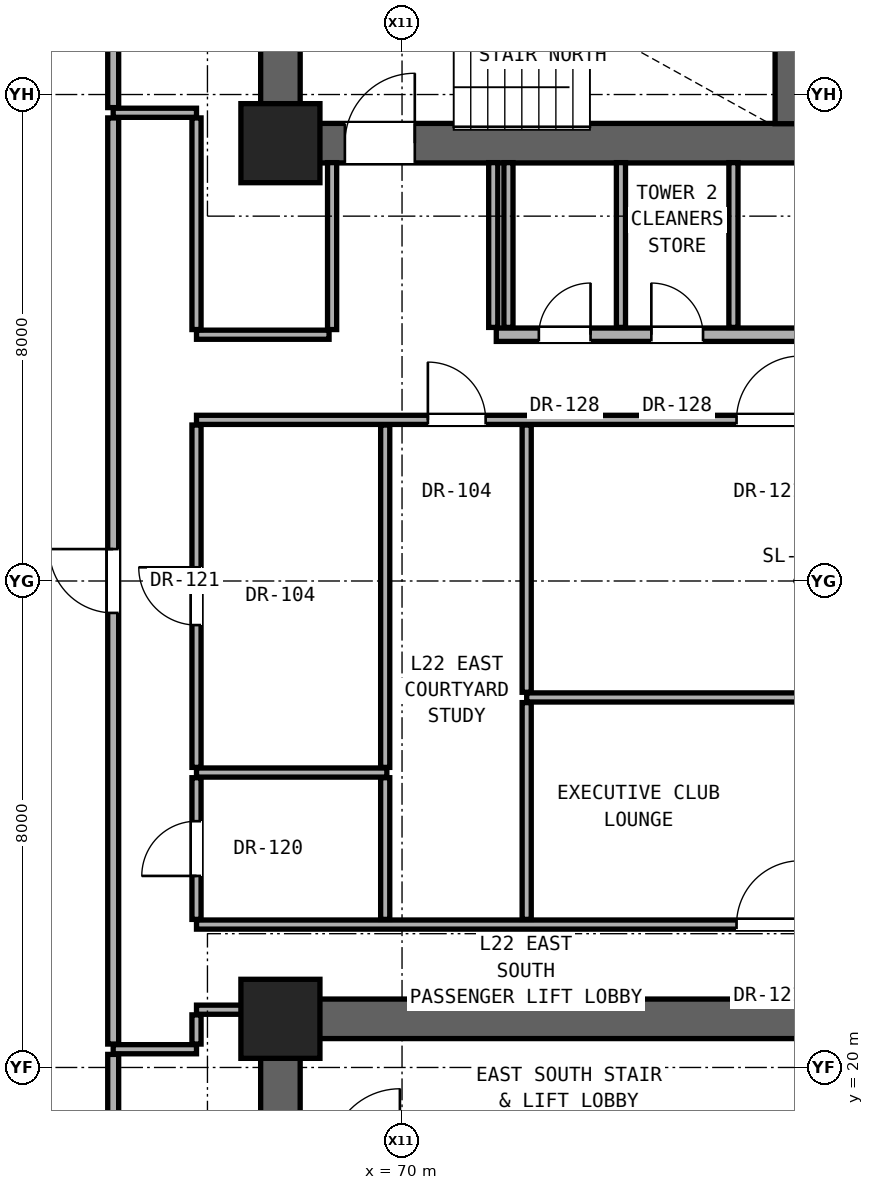
"""IFC4 building model, lengths in metres.
Left out: names, types, materials, properties, quantities, classifications, styles, units other than length and angle.
Written with IfcOpenShell. Run it as: python <this file> out.ifc"""

import sys

from ifc_helpers import new_model, si_unit, direction, frame, frame_2d, origin, origin_2d, place, context, subcontext, project, spatial, rectangle, extrude, element, fill, save


model = new_model("IFC4")
c1 = context("Model", 3, precision=1e-05, world=origin(), true_north=direction((0.0, 1.0)))
c2 = subcontext(c1, "Body", "Model", "MODEL_VIEW")
j1 = project(units=[si_unit("LENGTHUNIT", "METRE"), si_unit("PLANEANGLEUNIT", "RADIAN")], contexts=[c1])
p1 = place(None, origin())
s1 = spatial("IfcSite", under=j1, at=p1, CompositionType="ELEMENT")
p2 = place(p1, origin())
s2 = spatial("IfcBuilding", under=s1, at=p2, CompositionType="ELEMENT")
p3 = place(p2, frame((0.0, 0.0, 78.5)))
s3 = spatial("IfcBuildingStorey", under=s2, at=p3, CompositionType="ELEMENT", Elevation=78.5)
for number, where, z_axis, x_axis in (
    (1, (68.0, 20.8, 0.0), (0.0, 0.0, 1.0), (1.0, 0.0, 0.0)),
    (2, (68.0, 35.2, 0.0), (0.0, 0.0, 1.0), (1.0, 0.0, 0.0)),
):
    element("IfcColumn", number, at=place(p3, frame(where, z_axis=z_axis, x_axis=x_axis)), inside=s3, PredefinedType="COLUMN", context=c2, shape_type="SweptSolid", body=[
        extrude(rectangle(XDim=1.3, YDim=1.3, at=origin_2d()), origin(), (0.0, 0.0, 1.0), 3.3),
    ])
p4 = place(p3, frame((68.0, 35.2, 0.0), z_axis=(0.0, 0.0, 1.0), x_axis=(0.0, 1.0, 0.0)))
e3 = element("IfcWall", 3, at=p4, inside=s3, PredefinedType="SHEAR", context=c2, shape_type="SweptSolid", body=[
    extrude(rectangle(XDim=5.6, YDim=0.65, at=frame_2d((2.8, 0.0))), origin(), (0.0, 0.0, 1.0), 2.94),
])
p5 = place(p3, frame((68.0, 35.2, 0.0), z_axis=(0.0, 0.0, 1.0), x_axis=(1.0, 0.0, 0.0)))
e4 = element("IfcWall", 4, at=p5, inside=s3, PredefinedType="SHEAR", context=c2, shape_type="SweptSolid", body=[
    extrude(rectangle(XDim=17.0, YDim=0.65, at=frame_2d((8.5, 0.0))), origin(), (0.0, 0.0, 1.0), 2.94),
])
p6 = place(p5, frame((1.06, 0.0, 0.0)))
e5 = element("IfcOpeningElement", 5, at=p6, cuts=e4, PredefinedType="OPENING", context=c2, shape_type="SweptSolid", body=[
    extrude(rectangle(XDim=1.15, YDim=2.2, at=frame_2d((0.575, 1.1))), frame((0.0, 0.335, 0.0), z_axis=(0.0, -1.0, 0.0), x_axis=(1.0, 0.0, 0.0)), (0.0, 0.0, 1.0), 0.67),
])
p7 = place(p5, frame((8.75, 0.0, 0.0)))
e6 = element("IfcOpeningElement", 6, at=p7, cuts=e4, PredefinedType="OPENING", context=c2, shape_type="SweptSolid", body=[
    extrude(rectangle(XDim=1.4, YDim=2.35, at=frame_2d((0.7, 1.175))), frame((0.0, 0.335, 0.0), z_axis=(0.0, -1.0, 0.0), x_axis=(1.0, 0.0, 0.0)), (0.0, 0.0, 1.0), 0.67),
])
p8 = place(p5, frame((10.77, 0.0, 0.0)))
e7 = element("IfcOpeningElement", 7, at=p8, cuts=e4, PredefinedType="OPENING", context=c2, shape_type="SweptSolid", body=[
    extrude(rectangle(XDim=1.3, YDim=2.3, at=frame_2d((0.65, 1.15))), frame((0.0, 0.335, 0.0), z_axis=(0.0, -1.0, 0.0), x_axis=(1.0, 0.0, 0.0)), (0.0, 0.0, 1.0), 0.67),
])
p9 = place(p5, frame((12.69, 0.0, 0.0)))
e8 = element("IfcOpeningElement", 8, at=p9, cuts=e4, PredefinedType="OPENING", context=c2, shape_type="SweptSolid", body=[
    extrude(rectangle(XDim=1.3, YDim=2.3, at=frame_2d((0.65, 1.15))), frame((0.0, 0.335, 0.0), z_axis=(0.0, -1.0, 0.0), x_axis=(1.0, 0.0, 0.0)), (0.0, 0.0, 1.0), 0.67),
])
p10 = place(p5, frame((14.57, 0.0, 0.0)))
e9 = element("IfcOpeningElement", 9, at=p10, cuts=e4, PredefinedType="OPENING", context=c2, shape_type="SweptSolid", body=[
    extrude(rectangle(XDim=1.3, YDim=2.3, at=frame_2d((0.65, 1.15))), frame((0.0, 0.335, 0.0), z_axis=(0.0, -1.0, 0.0), x_axis=(1.0, 0.0, 0.0)), (0.0, 0.0, 1.0), 0.67),
])
p11 = place(p3, frame((68.0, 15.2, 0.0), z_axis=(0.0, 0.0, 1.0), x_axis=(0.0, 1.0, 0.0)))
e10 = element("IfcWall", 10, at=p11, inside=s3, PredefinedType="SHEAR", context=c2, shape_type="SweptSolid", body=[
    extrude(rectangle(XDim=5.6, YDim=0.65, at=frame_2d((2.8, 0.0))), origin(), (0.0, 0.0, 1.0), 2.94),
])
p12 = place(p3, frame((68.0, 20.8, 0.0), z_axis=(0.0, 0.0, 1.0), x_axis=(1.0, 0.0, 0.0)))
e11 = element("IfcWall", 11, at=p12, inside=s3, PredefinedType="SHEAR", context=c2, shape_type="SweptSolid", body=[
    extrude(rectangle(XDim=17.0, YDim=0.65, at=frame_2d((8.5, 0.0))), origin(), (0.0, 0.0, 1.0), 2.94),
])
p13 = place(p12, frame((9.55, 0.0, 0.0)))
e12 = element("IfcOpeningElement", 12, at=p13, cuts=e11, PredefinedType="OPENING", context=c2, shape_type="SweptSolid", body=[
    extrude(rectangle(XDim=1.3, YDim=2.3, at=frame_2d((0.65, 1.15))), frame((0.0, 0.335, 0.0), z_axis=(0.0, -1.0, 0.0), x_axis=(1.0, 0.0, 0.0)), (0.0, 0.0, 1.0), 0.67),
])
p14 = place(p12, frame((12.05, 0.0, 0.0)))
e13 = element("IfcOpeningElement", 13, at=p14, cuts=e11, PredefinedType="OPENING", context=c2, shape_type="SweptSolid", body=[
    extrude(rectangle(XDim=1.3, YDim=2.3, at=frame_2d((0.65, 1.15))), frame((0.0, 0.335, 0.0), z_axis=(0.0, -1.0, 0.0), x_axis=(1.0, 0.0, 0.0)), (0.0, 0.0, 1.0), 0.67),
])
p15 = place(p3, frame((65.25, 20.3, 0.0), z_axis=(0.0, 0.0, 1.0), x_axis=(1.0, 0.0, 0.0)))
e14 = element("IfcWall", 14, at=p15, inside=s3, PredefinedType="PARTITIONING", context=c2, shape_type="SweptSolid", body=[
    extrude(rectangle(XDim=1.37, YDim=0.15, at=frame_2d((0.685, 0.0))), origin(), (0.0, 0.0, 1.0), 2.94),
])
p16 = place(p3, frame((66.62, 20.95, 0.0), z_axis=(0.0, 0.0, 1.0), x_axis=(1.0, 0.0, 0.0)))
e15 = element("IfcWall", 15, at=p16, inside=s3, PredefinedType="PARTITIONING", context=c2, shape_type="SweptSolid", body=[
    extrude(rectangle(XDim=1.06, YDim=0.15, at=frame_2d((0.53, 0.0))), origin(), (0.0, 0.0, 1.0), 2.332),
])
p17 = place(p3, frame((66.62, 22.35, 0.0), z_axis=(0.0, 0.0, 1.0), x_axis=(1.0, 0.0, 0.0)))
e16 = element("IfcWall", 16, at=p17, inside=s3, PredefinedType="PARTITIONING", context=c2, shape_type="SweptSolid", body=[
    extrude(rectangle(XDim=19.63, YDim=0.15, at=frame_2d((9.815, 0.0))), origin(), (0.0, 0.0, 1.0), 2.316),
])
p18 = place(p17, frame((8.881, 0.0, 0.0)))
e17 = element("IfcOpeningElement", 17, at=p18, cuts=e16, PredefinedType="OPENING", context=c2, shape_type="SweptSolid", body=[
    extrude(rectangle(XDim=1.05, YDim=2.2, at=frame_2d((0.525, 1.1))), frame((0.0, 0.085, 0.0), z_axis=(0.0, -1.0, 0.0), x_axis=(1.0, 0.0, 0.0)), (0.0, 0.0, 1.0), 0.17),
])
p19 = place(p17, frame((15.961, 0.0, 0.0)))
e18 = element("IfcOpeningElement", 18, at=p19, cuts=e16, PredefinedType="OPENING", context=c2, shape_type="SweptSolid", body=[
    extrude(rectangle(XDim=1.05, YDim=2.2, at=frame_2d((0.525, 1.1))), frame((0.0, 0.085, 0.0), z_axis=(0.0, -1.0, 0.0), x_axis=(1.0, 0.0, 0.0)), (0.0, 0.0, 1.0), 0.17),
])
p20 = place(p3, frame((66.62, 24.85, 0.0), z_axis=(0.0, 0.0, 1.0), x_axis=(1.0, 0.0, 0.0)))
e19 = element("IfcWall", 19, at=p20, inside=s3, PredefinedType="PARTITIONING", context=c2, shape_type="SweptSolid", body=[
    extrude(rectangle(XDim=3.13, YDim=0.15, at=frame_2d((1.565, 0.0))), origin(), (0.0, 0.0, 1.0), 2.316),
])
p21 = place(p3, frame((72.05, 26.085, 0.0), z_axis=(0.0, 0.0, 1.0), x_axis=(1.0, 0.0, 0.0)))
e20 = element("IfcWall", 20, at=p21, inside=s3, PredefinedType="PARTITIONING", context=c2, shape_type="SweptSolid", body=[
    extrude(rectangle(XDim=14.2, YDim=0.15, at=frame_2d((7.1, 0.0))), origin(), (0.0, 0.0, 1.0), 2.316),
])
p22 = place(p3, frame((66.62, 30.65, 0.0), z_axis=(0.0, 0.0, 1.0), x_axis=(1.0, 0.0, 0.0)))
e21 = element("IfcWall", 21, at=p22, inside=s3, PredefinedType="PARTITIONING", context=c2, shape_type="SweptSolid", body=[
    extrude(rectangle(XDim=19.63, YDim=0.15, at=frame_2d((9.815, 0.0))), origin(), (0.0, 0.0, 1.0), 2.316),
])
p23 = place(p22, frame((3.805, 0.0, 0.0)))
e22 = element("IfcOpeningElement", 22, at=p23, cuts=e21, PredefinedType="OPENING", context=c2, shape_type="SweptSolid", body=[
    extrude(rectangle(XDim=0.95, YDim=2.15, at=frame_2d((0.475, 1.075))), frame((0.0, 0.085, 0.0), z_axis=(0.0, -1.0, 0.0), x_axis=(1.0, 0.0, 0.0)), (0.0, 0.0, 1.0), 0.17),
])
p24 = place(p22, frame((8.881, 0.0, 0.0)))
e23 = element("IfcOpeningElement", 23, at=p24, cuts=e21, PredefinedType="OPENING", context=c2, shape_type="SweptSolid", body=[
    extrude(rectangle(XDim=1.05, YDim=2.2, at=frame_2d((0.525, 1.1))), frame((0.0, 0.085, 0.0), z_axis=(0.0, -1.0, 0.0), x_axis=(1.0, 0.0, 0.0)), (0.0, 0.0, 1.0), 0.17),
])
p25 = place(p22, frame((15.961, 0.0, 0.0)))
e24 = element("IfcOpeningElement", 24, at=p25, cuts=e21, PredefinedType="OPENING", context=c2, shape_type="SweptSolid", body=[
    extrude(rectangle(XDim=1.05, YDim=2.2, at=frame_2d((0.525, 1.1))), frame((0.0, 0.085, 0.0), z_axis=(0.0, -1.0, 0.0), x_axis=(1.0, 0.0, 0.0)), (0.0, 0.0, 1.0), 0.17),
])
p26 = place(p3, frame((66.62, 32.05, 0.0), z_axis=(0.0, 0.0, 1.0), x_axis=(1.0, 0.0, 0.0)))
e25 = element("IfcWall", 25, at=p26, inside=s3, PredefinedType="PARTITIONING", context=c2, shape_type="SweptSolid", body=[
    extrude(rectangle(XDim=2.18, YDim=0.15, at=frame_2d((1.09, 0.0))), origin(), (0.0, 0.0, 1.0), 2.316),
])
p27 = place(p3, frame((71.55, 32.05, 0.0), z_axis=(0.0, 0.0, 1.0), x_axis=(1.0, 0.0, 0.0)))
e26 = element("IfcWall", 26, at=p27, inside=s3, PredefinedType="SOLIDWALL", context=c2, shape_type="SweptSolid", body=[
    extrude(rectangle(XDim=14.7, YDim=0.22, at=frame_2d((7.35, 0.0))), origin(), (0.0, 0.0, 1.0), 2.316),
])
p28 = place(p27, frame((11.215, 0.0, 0.0)))
e27 = element("IfcOpeningElement", 27, at=p28, cuts=e26, PredefinedType="OPENING", context=c2, shape_type="SweptSolid", body=[
    extrude(rectangle(XDim=1.2, YDim=2.25, at=frame_2d((0.6, 1.125))), frame((0.0, 0.12, 0.0), z_axis=(0.0, -1.0, 0.0), x_axis=(1.0, 0.0, 0.0)), (0.0, 0.0, 1.0), 0.24),
])
p29 = place(p27, frame((5.89, 0.0, 0.0)))
e28 = element("IfcOpeningElement", 28, at=p29, cuts=e26, PredefinedType="OPENING", context=c2, shape_type="SweptSolid", body=[
    extrude(rectangle(XDim=1.2, YDim=2.25, at=frame_2d((0.6, 1.125))), frame((0.0, 0.12, 0.0), z_axis=(0.0, -1.0, 0.0), x_axis=(1.0, 0.0, 0.0)), (0.0, 0.0, 1.0), 0.24),
])
p30 = place(p27, frame((0.7, 0.0, 0.0)))
e29 = element("IfcOpeningElement", 29, at=p30, cuts=e26, PredefinedType="OPENING", context=c2, shape_type="SweptSolid", body=[
    extrude(rectangle(XDim=0.85, YDim=2.01, at=frame_2d((0.425, 1.005))), frame((0.0, 0.12, 0.0), z_axis=(0.0, -1.0, 0.0), x_axis=(1.0, 0.0, 0.0)), (0.0, 0.0, 1.0), 0.24),
])
p31 = place(p27, frame((2.55, 0.0, 0.0)))
e30 = element("IfcOpeningElement", 30, at=p31, cuts=e26, PredefinedType="OPENING", context=c2, shape_type="SweptSolid", body=[
    extrude(rectangle(XDim=0.85, YDim=2.01, at=frame_2d((0.425, 1.005))), frame((0.0, 0.12, 0.0), z_axis=(0.0, -1.0, 0.0), x_axis=(1.0, 0.0, 0.0)), (0.0, 0.0, 1.0), 0.24),
])
p32 = place(p3, frame((65.25, 35.7, 0.0), z_axis=(0.0, 0.0, 1.0), x_axis=(1.0, 0.0, 0.0)))
e31 = element("IfcWall", 31, at=p32, inside=s3, PredefinedType="PARTITIONING", context=c2, shape_type="SweptSolid", body=[
    extrude(rectangle(XDim=1.37, YDim=0.15, at=frame_2d((0.685, 0.0))), origin(), (0.0, 0.0, 1.0), 2.94),
])
p33 = place(p3, frame((65.25, 16.204, 0.0), z_axis=(0.0, 0.0, 1.0), x_axis=(0.0, 1.0, 0.0)))
e32 = element("IfcWall", 32, at=p33, inside=s3, PredefinedType="PARTITIONING", context=c2, shape_type="SweptSolid", body=[
    extrude(rectangle(XDim=4.011, YDim=0.18, at=frame_2d((2.005, 0.0))), origin(), (0.0, 0.0, 1.0), 2.316),
])
p34 = place(p3, frame((65.25, 20.385, 0.0), z_axis=(0.0, 0.0, 1.0), x_axis=(0.0, 1.0, 0.0)))
e33 = element("IfcWall", 33, at=p34, inside=s3, PredefinedType="PARTITIONING", context=c2, shape_type="SweptSolid", body=[
    extrude(rectangle(XDim=15.23, YDim=0.18, at=frame_2d((7.615, 0.0))), origin(), (0.0, 0.0, 1.0), 2.316),
])
p35 = place(p34, frame((7.09, 0.0, 0.0)))
e34 = element("IfcOpeningElement", 34, at=p35, cuts=e33, PredefinedType="OPENING", context=c2, shape_type="SweptSolid", body=[
    extrude(rectangle(XDim=1.05, YDim=2.2, at=frame_2d((0.525, 1.1))), frame((0.0, 0.1, 0.0), z_axis=(0.0, -1.0, 0.0), x_axis=(1.0, 0.0, 0.0)), (0.0, 0.0, 1.0), 0.2),
])
p36 = place(p3, frame((65.25, 35.785, 0.0), z_axis=(0.0, 0.0, 1.0), x_axis=(0.0, 1.0, 0.0)))
e35 = element("IfcWall", 35, at=p36, inside=s3, PredefinedType="PARTITIONING", context=c2, shape_type="SweptSolid", body=[
    extrude(rectangle(XDim=1.291, YDim=0.18, at=frame_2d((0.646, 0.0))), origin(), (0.0, 0.0, 1.0), 2.94),
])
p37 = place(p3, frame((66.62, 20.385, 0.0), z_axis=(0.0, 0.0, 1.0), x_axis=(0.0, 1.0, 0.0)))
e36 = element("IfcWall", 36, at=p37, inside=s3, PredefinedType="PARTITIONING", context=c2, shape_type="SweptSolid", body=[
    extrude(rectangle(XDim=0.48, YDim=0.15, at=frame_2d((0.24, 0.0))), origin(), (0.0, 0.0, 1.0), 2.332),
])
p38 = place(p3, frame((66.62, 22.435, 0.0), z_axis=(0.0, 0.0, 1.0), x_axis=(0.0, 1.0, 0.0)))
e37 = element("IfcWall", 37, at=p38, inside=s3, PredefinedType="PARTITIONING", context=c2, shape_type="SweptSolid", body=[
    extrude(rectangle(XDim=2.33, YDim=0.15, at=frame_2d((1.165, 0.0))), origin(), (0.0, 0.0, 1.0), 2.94),
])
p39 = place(p38, frame((0.715, 0.0, 0.0)))
e38 = element("IfcOpeningElement", 38, at=p39, cuts=e37, PredefinedType="OPENING", context=c2, shape_type="SweptSolid", body=[
    extrude(rectangle(XDim=0.9, YDim=2.1, at=frame_2d((0.45, 1.05))), frame((0.0, 0.085, 0.0), z_axis=(0.0, -1.0, 0.0), x_axis=(1.0, 0.0, 0.0)), (0.0, 0.0, 1.0), 0.17),
])
p40 = place(p3, frame((66.62, 24.935, 0.0), z_axis=(0.0, 0.0, 1.0), x_axis=(0.0, 1.0, 0.0)))
e39 = element("IfcWall", 39, at=p40, inside=s3, PredefinedType="PARTITIONING", context=c2, shape_type="SweptSolid", body=[
    extrude(rectangle(XDim=5.63, YDim=0.15, at=frame_2d((2.815, 0.0))), origin(), (0.0, 0.0, 1.0), 2.316),
])
p41 = place(p40, frame((2.34, 0.0, 0.0)))
e40 = element("IfcOpeningElement", 40, at=p41, cuts=e39, PredefinedType="OPENING", context=c2, shape_type="SweptSolid", body=[
    extrude(rectangle(XDim=0.95, YDim=2.15, at=frame_2d((0.475, 1.075))), frame((0.0, 0.085, 0.0), z_axis=(0.0, -1.0, 0.0), x_axis=(1.0, 0.0, 0.0)), (0.0, 0.0, 1.0), 0.17),
])
p42 = place(p3, frame((66.62, 32.135, 0.0), z_axis=(0.0, 0.0, 1.0), x_axis=(0.0, 1.0, 0.0)))
e41 = element("IfcWall", 41, at=p42, inside=s3, PredefinedType="PARTITIONING", context=c2, shape_type="SweptSolid", body=[
    extrude(rectangle(XDim=3.48, YDim=0.15, at=frame_2d((1.74, 0.0))), origin(), (0.0, 0.0, 1.0), 2.332),
])
p43 = place(p3, frame((68.85, 32.135, 0.0), z_axis=(0.0, 0.0, 1.0), x_axis=(0.0, 1.0, 0.0)))
e42 = element("IfcWall", 42, at=p43, inside=s3, PredefinedType="PARTITIONING", context=c2, shape_type="SweptSolid", body=[
    extrude(rectangle(XDim=2.745, YDim=0.15, at=frame_2d((1.373, 0.0))), origin(), (0.0, 0.0, 1.0), 2.94),
])
p44 = place(p3, frame((69.723, 22.435, 0.0), z_axis=(0.0, 0.0, 1.0), x_axis=(0.0, 1.0, 0.0)))
e43 = element("IfcWall", 43, at=p44, inside=s3, PredefinedType="PARTITIONING", context=c2, shape_type="SweptSolid", body=[
    extrude(rectangle(XDim=2.33, YDim=0.15, at=frame_2d((1.165, 0.0))), origin(), (0.0, 0.0, 1.0), 2.94),
])
p45 = place(p3, frame((69.723, 24.935, 0.0), z_axis=(0.0, 0.0, 1.0), x_axis=(0.0, 1.0, 0.0)))
e44 = element("IfcWall", 44, at=p45, inside=s3, PredefinedType="PARTITIONING", context=c2, shape_type="SweptSolid", body=[
    extrude(rectangle(XDim=5.63, YDim=0.15, at=frame_2d((2.815, 0.0))), origin(), (0.0, 0.0, 1.0), 2.316),
])
for number, where, z_axis, x_axis in (
    (45, (71.5, 32.17, 0.0), (0.0, 0.0, 1.0), (0.0, 1.0, 0.0)),
    (46, (71.75, 32.17, 0.0), (0.0, 0.0, 1.0), (0.0, 1.0, 0.0)),
):
    element("IfcWall", number, at=place(p3, frame(where, z_axis=z_axis, x_axis=x_axis)), inside=s3, PredefinedType="PARTITIONING", context=c2, shape_type="SweptSolid", body=[
        extrude(rectangle(XDim=2.71, YDim=0.15, at=frame_2d((1.355, 0.0))), origin(), (0.0, 0.0, 1.0), 2.94),
    ])
p46 = place(p3, frame((72.05, 22.435, 0.0), z_axis=(0.0, 0.0, 1.0), x_axis=(0.0, 1.0, 0.0)))
e47 = element("IfcWall", 47, at=p46, inside=s3, PredefinedType="PARTITIONING", context=c2, shape_type="SweptSolid", body=[
    extrude(rectangle(XDim=3.565, YDim=0.15, at=frame_2d((1.782, 0.0))), origin(), (0.0, 0.0, 1.0), 2.469),
])
p47 = place(p3, frame((72.05, 26.17, 0.0), z_axis=(0.0, 0.0, 1.0), x_axis=(0.0, 1.0, 0.0)))
e48 = element("IfcWall", 48, at=p47, inside=s3, PredefinedType="PARTITIONING", context=c2, shape_type="SweptSolid", body=[
    extrude(rectangle(XDim=4.395, YDim=0.15, at=frame_2d((2.198, 0.0))), origin(), (0.0, 0.0, 1.0), 2.316),
])
for number, where, z_axis, x_axis in (
    (49, (73.6, 32.17, 0.0), (0.0, 0.0, 1.0), (0.0, 1.0, 0.0)),
    (50, (75.45, 32.17, 0.0), (0.0, 0.0, 1.0), (0.0, 1.0, 0.0)),
):
    element("IfcWall", number, at=place(p3, frame(where, z_axis=z_axis, x_axis=x_axis)), inside=s3, PredefinedType="PARTITIONING", context=c2, shape_type="SweptSolid", body=[
        extrude(rectangle(XDim=2.71, YDim=0.15, at=frame_2d((1.355, 0.0))), origin(), (0.0, 0.0, 1.0), 2.94),
    ])
p48 = place(p3, frame((76.36, 35.52, 0.0), z_axis=(0.0, 0.0, 1.0), x_axis=(0.0, 1.0, 0.0)))
e51 = element("IfcWall", 51, at=p48, inside=s3, PredefinedType="SHEAR", context=c2, shape_type="SweptSolid", body=[
    extrude(rectangle(XDim=2.745, YDim=0.45, at=frame_2d((1.373, 0.0))), origin(), (0.0, 0.0, 1.0), 2.94),
])
p49 = place(p6, origin())
e52 = element("IfcDoor", 52, at=p49, inside=s3, OperationType="SINGLE_SWING_RIGHT", PredefinedType="DOOR", context=c2, shape_type="SweptSolid", body=[
    extrude(rectangle(XDim=1.15, YDim=2.2, at=frame_2d((0.575, 1.1))), frame((0.0, 0.025, 0.0), z_axis=(0.0, -1.0, 0.0), x_axis=(1.0, 0.0, 0.0)), (0.0, 0.0, 1.0), 0.05),
])
fill(e5, e52)
p50 = place(p30, origin())
e53 = element("IfcDoor", 53, at=p50, inside=s3, OperationType="SINGLE_SWING_RIGHT", PredefinedType="DOOR", context=c2, shape_type="SweptSolid", body=[
    extrude(rectangle(XDim=0.85, YDim=2.01, at=frame_2d((0.425, 1.005))), frame((0.0, 0.025, 0.0), z_axis=(0.0, -1.0, 0.0), x_axis=(1.0, 0.0, 0.0)), (0.0, 0.0, 1.0), 0.05),
])
fill(e29, e53)
p51 = place(p31, origin())
e54 = element("IfcDoor", 54, at=p51, inside=s3, OperationType="SINGLE_SWING_LEFT", PredefinedType="DOOR", context=c2, shape_type="SweptSolid", body=[
    extrude(rectangle(XDim=0.85, YDim=2.01, at=frame_2d((0.425, 1.005))), frame((0.0, 0.025, 0.0), z_axis=(0.0, -1.0, 0.0), x_axis=(1.0, 0.0, 0.0)), (0.0, 0.0, 1.0), 0.05),
])
fill(e30, e54)
p52 = place(p39, origin())
e55 = element("IfcDoor", 55, at=p52, inside=s3, OperationType="SINGLE_SWING_LEFT", PredefinedType="DOOR", context=c2, shape_type="SweptSolid", body=[
    extrude(rectangle(XDim=0.9, YDim=2.1, at=frame_2d((0.45, 1.05))), frame((0.0, 0.025, 0.0), z_axis=(0.0, -1.0, 0.0), x_axis=(1.0, 0.0, 0.0)), (0.0, 0.0, 1.0), 0.05),
])
fill(e38, e55)
p53 = place(p35, origin())
e56 = element("IfcDoor", 56, at=p53, inside=s3, OperationType="SINGLE_SWING_RIGHT", PredefinedType="DOOR", context=c2, shape_type="SweptSolid", body=[
    extrude(rectangle(XDim=1.05, YDim=2.2, at=frame_2d((0.525, 1.1))), frame((0.0, 0.025, 0.0), z_axis=(0.0, -1.0, 0.0), x_axis=(1.0, 0.0, 0.0)), (0.0, 0.0, 1.0), 0.05),
])
fill(e34, e56)
p54 = place(p41, origin())
e57 = element("IfcDoor", 57, at=p54, inside=s3, OperationType="SINGLE_SWING_RIGHT", PredefinedType="DOOR", context=c2, shape_type="SweptSolid", body=[
    extrude(rectangle(XDim=0.95, YDim=2.15, at=frame_2d((0.475, 1.075))), frame((0.0, 0.025, 0.0), z_axis=(0.0, -1.0, 0.0), x_axis=(1.0, 0.0, 0.0)), (0.0, 0.0, 1.0), 0.05),
])
fill(e40, e57)
p55 = place(p23, origin())
e58 = element("IfcDoor", 58, at=p55, inside=s3, OperationType="SINGLE_SWING_LEFT", PredefinedType="DOOR", context=c2, shape_type="SweptSolid", body=[
    extrude(rectangle(XDim=0.95, YDim=2.15, at=frame_2d((0.475, 1.075))), frame((0.0, 0.025, 0.0), z_axis=(0.0, -1.0, 0.0), x_axis=(1.0, 0.0, 0.0)), (0.0, 0.0, 1.0), 0.05),
])
fill(e22, e58)
p56 = place(p18, origin())
e59 = element("IfcDoor", 59, at=p56, inside=s3, OperationType="SINGLE_SWING_RIGHT", PredefinedType="DOOR", context=c2, shape_type="SweptSolid", body=[
    extrude(rectangle(XDim=1.05, YDim=2.2, at=frame_2d((0.525, 1.1))), frame((0.0, 0.025, 0.0), z_axis=(0.0, -1.0, 0.0), x_axis=(1.0, 0.0, 0.0)), (0.0, 0.0, 1.0), 0.05),
])
fill(e17, e59)
p57 = place(p24, origin())
e60 = element("IfcDoor", 60, at=p57, inside=s3, OperationType="SINGLE_SWING_RIGHT", PredefinedType="DOOR", context=c2, shape_type="SweptSolid", body=[
    extrude(rectangle(XDim=1.05, YDim=2.2, at=frame_2d((0.525, 1.1))), frame((0.0, 0.025, 0.0), z_axis=(0.0, -1.0, 0.0), x_axis=(1.0, 0.0, 0.0)), (0.0, 0.0, 1.0), 0.05),
])
fill(e23, e60)
save(model, sys.argv[1])
